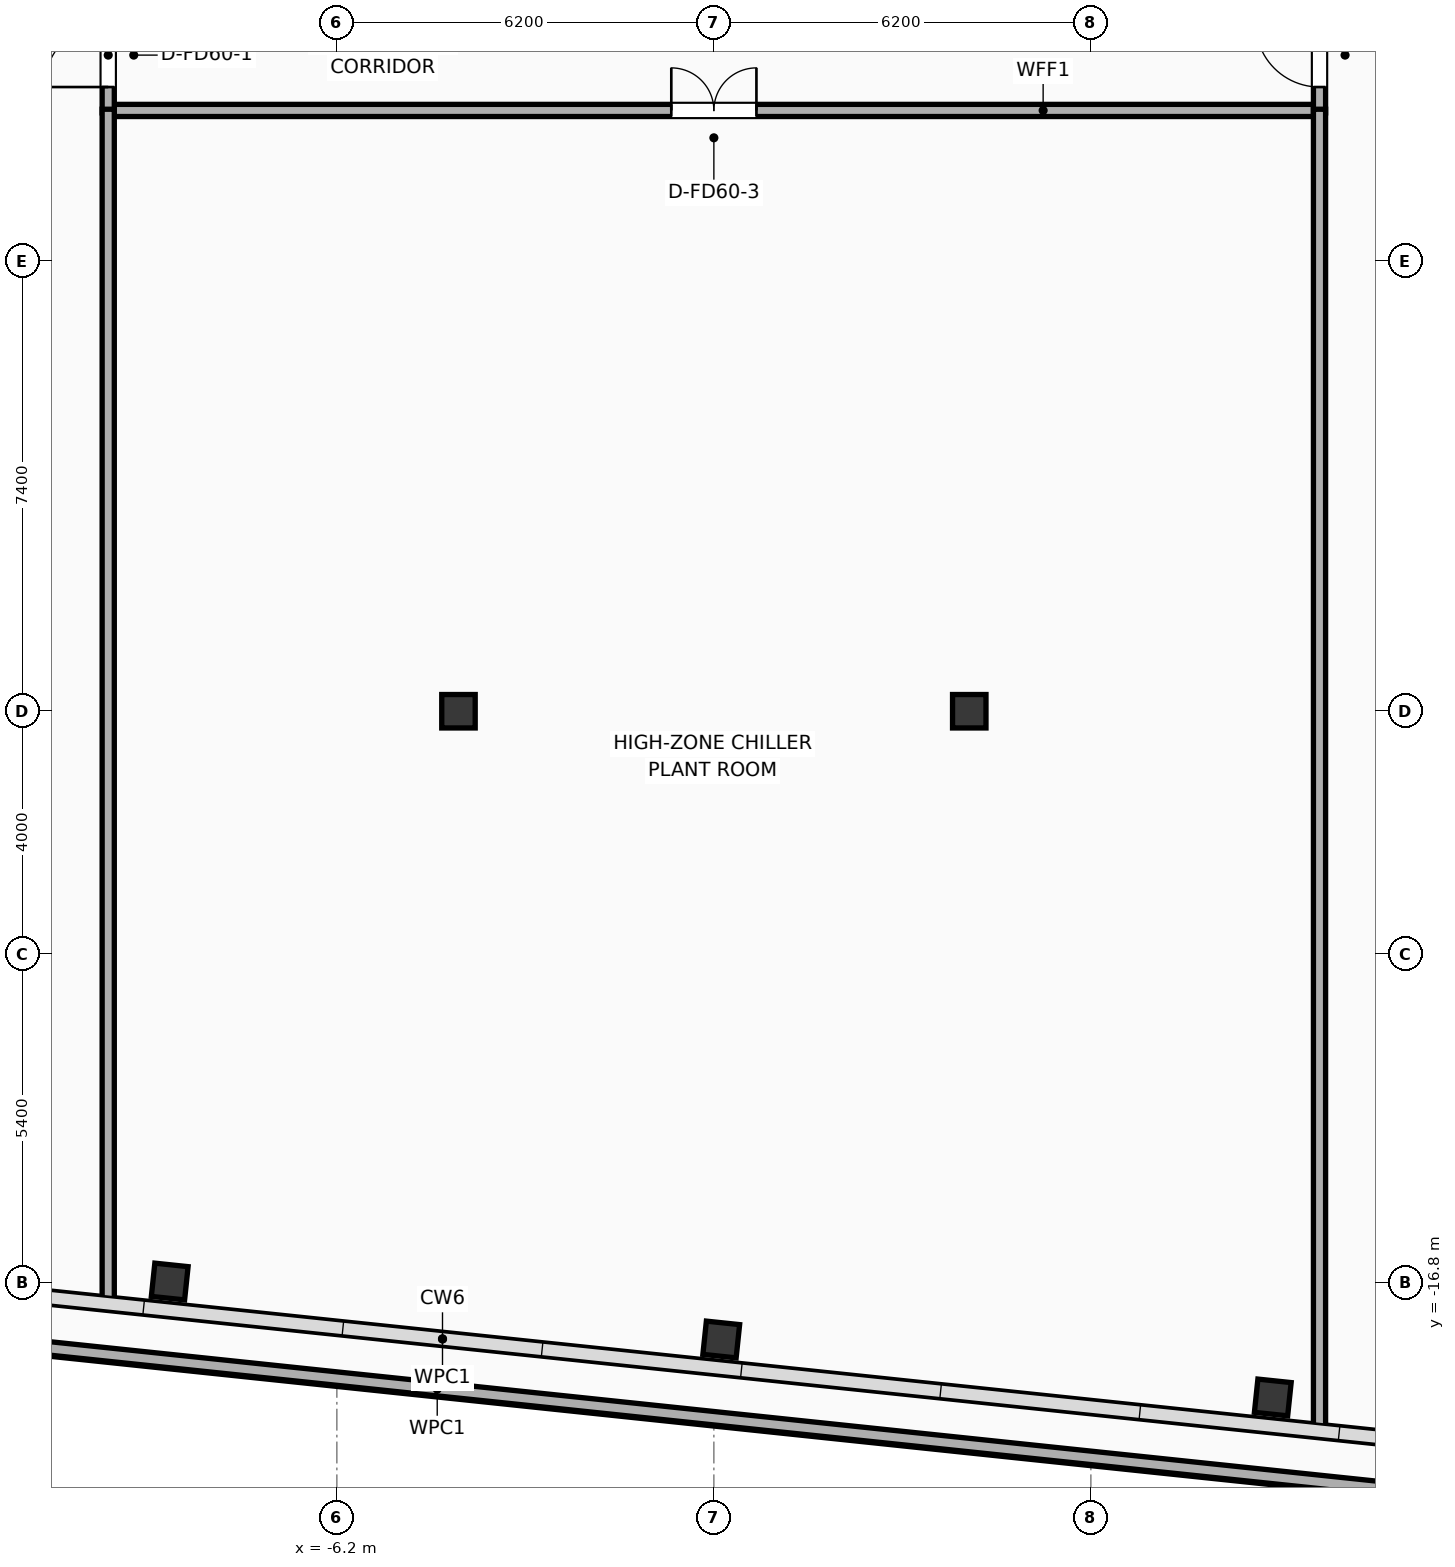
"""IFC4 building model, lengths in metres.
Left out: names, types, materials, properties, quantities, classifications, styles, units other than length and angle.
Written with IfcOpenShell. Run it as: python <this file> out.ifc"""

import sys

from ifc_helpers import new_model, si_unit, direction, frame, frame_2d, origin, origin_2d, place, context, subcontext, project, spatial, rectangle, hollow_rectangle, extrude, element, fill, save


model = new_model("IFC4")
c1 = context("Model", 3, precision=1e-05, world=origin(), true_north=direction((0.0, 1.0)))
c2 = subcontext(c1, "Body", "Model", "MODEL_VIEW")
j1 = project(units=[si_unit("LENGTHUNIT", "METRE"), si_unit("PLANEANGLEUNIT", "RADIAN")], contexts=[c1])
p1 = place(None, origin())
s1 = spatial("IfcSite", under=j1, at=p1, CompositionType="ELEMENT")
p2 = place(p1, origin())
s2 = spatial("IfcBuilding", under=s1, at=p2, CompositionType="ELEMENT")
p3 = place(p2, frame((0.0, 0.0, 310.7)))
s3 = spatial("IfcBuildingStorey", under=s2, at=p3, CompositionType="ELEMENT", Elevation=310.7)
for number, where, z_axis, x_axis in (
    (1, (-4.2, -7.4, 0.0), (0.0, 0.0, 1.0), (1.0, 0.0, 0.0)),
    (2, (4.2, -7.4, 0.0), (0.0, 0.0, 1.0), (1.0, 0.0, 0.0)),
):
    element("IfcColumn", number, at=place(p3, frame(where, z_axis=z_axis, x_axis=x_axis)), inside=s3, PredefinedType="COLUMN", context=c2, shape_type="SweptSolid", body=[
        extrude(hollow_rectangle(XDim=0.55, YDim=0.55, WallThickness=0.022, at=origin_2d()), origin(), (0.0, 0.0, 1.0), 5.3),
    ])
for number, where, z_axis, x_axis in (
    (3, (-8.948, -16.778, -0.4), (0.0, 0.0, 1.0), (0.995, -0.105, 0.0)),
    (4, (0.121, -17.732, -0.4), (0.0, 0.0, 1.0), (0.995, -0.105, 0.0)),
    (5, (9.191, -18.685, -0.4), (0.0, 0.0, 1.0), (0.995, -0.105, 0.0)),
):
    element("IfcColumn", number, at=place(p3, frame(where, z_axis=z_axis, x_axis=x_axis)), inside=s3, PredefinedType="COLUMN", context=c2, shape_type="SweptSolid", body=[
        extrude(hollow_rectangle(XDim=0.55, YDim=0.55, WallThickness=0.022, at=origin_2d()), origin(), (0.0, 0.0, 1.0), 5.7),
    ])
p4 = place(p3, frame((18.195, -20.104, 0.0), z_axis=(0.0, 0.0, 1.0), x_axis=(-0.994522116558, 0.104526358762, 0.0)))
e6 = element("IfcWall", 6, at=p4, inside=s3, PredefinedType="PARAPET", context=c2, shape_type="SweptSolid", body=[
    extrude(rectangle(XDim=45.564, YDim=0.22, at=frame_2d((22.782, 0.0))), origin(), (0.0, 0.0, 1.0), 1.2),
])
p5 = place(p3, frame((18.708, -20.992, 0.0), z_axis=(0.0, 0.0, 1.0), x_axis=(-0.994522315485, 0.10452446605, 0.0)))
e7 = element("IfcWall", 7, at=p5, inside=s3, PredefinedType="PARAPET", context=c2, shape_type="SweptSolid", body=[
    extrude(rectangle(XDim=46.771, YDim=0.22, at=frame_2d((23.385, 0.0))), origin(), (0.0, 0.0, 1.0), 1.2),
])
p6 = place(p3, frame((-9.98, 2.48, 0.0), z_axis=(0.0, 0.0, 1.0), x_axis=(1.0, 0.0, 0.0)))
e8 = element("IfcWall", 8, at=p6, inside=s3, PredefinedType="PARTITIONING", context=c2, shape_type="SweptSolid", body=[
    extrude(rectangle(XDim=19.96, YDim=0.2, at=frame_2d((9.98, 0.0))), origin(), (0.0, 0.0, 1.0), 4.595),
])
p7 = place(p6, frame((9.28, 0.0, 0.0)))
e9 = element("IfcOpeningElement", 9, at=p7, cuts=e8, PredefinedType="OPENING", context=c2, shape_type="SweptSolid", body=[
    extrude(rectangle(XDim=1.4, YDim=2.05, at=frame_2d((0.7, 1.025))), frame((0.0, 0.11, 0.0), z_axis=(0.0, -1.0, 0.0), x_axis=(1.0, 0.0, 0.0)), (0.0, 0.0, 1.0), 0.22),
])
p8 = place(p3, frame((-9.96, 2.44, 0.0), z_axis=(0.0, 0.0, 1.0), x_axis=(0.0, 1.0, 0.0)))
e10 = element("IfcWall", 10, at=p8, inside=s3, PredefinedType="PARTITIONING", context=c2, shape_type="SweptSolid", body=[
    extrude(rectangle(XDim=1.9, YDim=0.2, at=frame_2d((0.95, 0.0))), origin(), (0.0, 0.0, 1.0), 5.025),
])
p9 = place(p8, frame((0.425, 0.0, 0.0)))
e11 = element("IfcOpeningElement", 11, at=p9, cuts=e10, PredefinedType="OPENING", context=c2, shape_type="SweptSolid", body=[
    extrude(rectangle(XDim=1.05, YDim=2.05, at=frame_2d((0.525, 1.025))), frame((0.0, 0.11, 0.0), z_axis=(0.0, -1.0, 0.0), x_axis=(1.0, 0.0, 0.0)), (0.0, 0.0, 1.0), 0.22),
])
p10 = place(p3, frame((9.96, 2.44, 0.0), z_axis=(0.0, 0.0, 1.0), x_axis=(0.0, 1.0, 0.0)))
e12 = element("IfcWall", 12, at=p10, inside=s3, PredefinedType="PARTITIONING", context=c2, shape_type="SweptSolid", body=[
    extrude(rectangle(XDim=1.9, YDim=0.2, at=frame_2d((0.95, 0.0))), origin(), (0.0, 0.0, 1.0), 5.025),
])
p11 = place(p10, frame((0.425, 0.0, 0.0)))
e13 = element("IfcOpeningElement", 13, at=p11, cuts=e12, PredefinedType="OPENING", context=c2, shape_type="SweptSolid", body=[
    extrude(rectangle(XDim=1.05, YDim=2.05, at=frame_2d((0.525, 1.025))), frame((0.0, 0.11, 0.0), z_axis=(0.0, -1.0, 0.0), x_axis=(1.0, 0.0, 0.0)), (0.0, 0.0, 1.0), 0.22),
])
p12 = place(p3, frame((-9.96, -17.125, 0.0), z_axis=(0.0, 0.0, 1.0), x_axis=(0.0, 1.0, 0.0)))
e14 = element("IfcWall", 14, at=p12, inside=s3, PredefinedType="PARTITIONING", context=c2, shape_type="SweptSolid", body=[
    extrude(rectangle(XDim=19.625, YDim=0.2, at=frame_2d((9.812, 0.0))), origin(), (0.0, 0.0, 1.0), 3.915),
])
p13 = place(p3, frame((9.96, -19.218, 0.0), z_axis=(0.0, 0.0, 1.0), x_axis=(0.0, 1.0, 0.0)))
e15 = element("IfcWall", 15, at=p13, inside=s3, PredefinedType="PARTITIONING", context=c2, shape_type="SweptSolid", body=[
    extrude(rectangle(XDim=21.718, YDim=0.2, at=frame_2d((10.859, 0.0))), origin(), (0.0, 0.0, 1.0), 3.915),
])
p14 = place(p7, origin())
e16 = element("IfcDoor", 16, at=p14, inside=s3, OperationType="DOUBLE_DOOR_SINGLE_SWING", PredefinedType="DOOR", context=c2, shape_type="SweptSolid", body=[
    extrude(rectangle(XDim=1.4, YDim=2.05, at=frame_2d((0.7, 1.025))), frame((0.0, 0.025, 0.0), z_axis=(0.0, -1.0, 0.0), x_axis=(1.0, 0.0, 0.0)), (0.0, 0.0, 1.0), 0.05),
])
fill(e9, e16)
p15 = place(p9, origin())
e17 = element("IfcDoor", 17, at=p15, inside=s3, OperationType="SINGLE_SWING_LEFT", PredefinedType="DOOR", context=c2, shape_type="SweptSolid", body=[
    extrude(rectangle(XDim=1.05, YDim=2.05, at=frame_2d((0.525, 1.025))), frame((0.0, 0.025, 0.0), z_axis=(0.0, -1.0, 0.0), x_axis=(1.0, 0.0, 0.0)), (0.0, 0.0, 1.0), 0.05),
])
fill(e11, e17)
p16 = place(p11, origin())
e18 = element("IfcDoor", 18, at=p16, inside=s3, OperationType="SINGLE_SWING_RIGHT", PredefinedType="DOOR", context=c2, shape_type="SweptSolid", body=[
    extrude(rectangle(XDim=1.05, YDim=2.05, at=frame_2d((0.525, 1.025))), frame((0.0, 0.025, 0.0), z_axis=(0.0, -1.0, 0.0), x_axis=(1.0, 0.0, 0.0)), (0.0, 0.0, 1.0), 0.05),
])
fill(e13, e18)
save(model, sys.argv[1])
